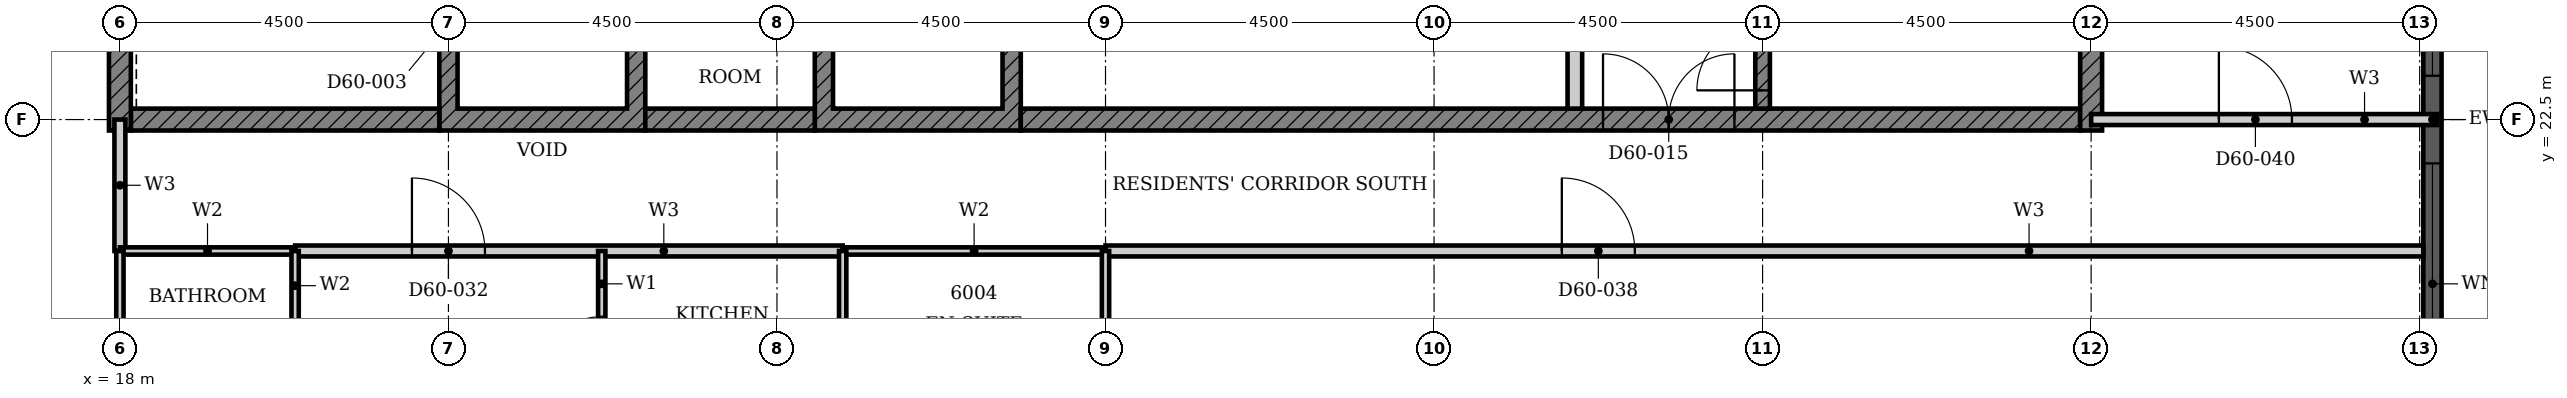
"""IFC4 building model, lengths in metres.
Left out: names, types, materials, properties, quantities, classifications, styles, units other than length and angle.
Written with IfcOpenShell. Run it as: python <this file> out.ifc"""

import sys

from ifc_helpers import new_model, si_unit, direction, frame, frame_2d, origin, place, context, subcontext, project, spatial, polyline, rectangle, outline, extrude, element, fill, save


model = new_model("IFC4")
c1 = context("Model", 3, precision=1e-05, world=origin(), true_north=direction((0.0, 1.0)))
c2 = subcontext(c1, "Body", "Model", "MODEL_VIEW")
j1 = project(units=[si_unit("LENGTHUNIT", "METRE"), si_unit("PLANEANGLEUNIT", "RADIAN")], contexts=[c1])
p1 = place(None, origin())
s1 = spatial("IfcSite", under=j1, at=p1, CompositionType="ELEMENT")
p2 = place(p1, origin())
s2 = spatial("IfcBuilding", under=s1, at=p2, CompositionType="ELEMENT")
p3 = place(p2, frame((0.0, 0.0, 237.9)))
s3 = spatial("IfcBuildingStorey", under=s2, at=p3, CompositionType="ELEMENT", Elevation=237.9)
p4 = place(p3, frame((49.675, 18.3, 0.0), z_axis=(0.0, 0.0, 1.0), x_axis=(0.0, 1.0, 0.0)))
e1 = element("IfcWall", 1, at=p4, inside=s3, PredefinedType="SOLIDWALL", context=c2, shape_type="SweptSolid", body=[
    extrude(rectangle(XDim=8.4, YDim=0.25, at=frame_2d((4.2, 0.0))), origin(), (0.0, 0.0, 1.0), 3.7),
])
p5 = place(p4, frame((0.3, 0.0, 0.45)))
e2 = element("IfcOpeningElement", 2, at=p5, cuts=e1, PredefinedType="OPENING", context=c2, shape_type="SweptSolid", body=[
    extrude(rectangle(XDim=3.3, YDim=2.3, at=frame_2d((1.65, 1.15))), frame((0.0, 0.135, 0.0), z_axis=(0.0, -1.0, 0.0), x_axis=(1.0, 0.0, 0.0)), (0.0, 0.0, 1.0), 0.27),
])
p6 = place(p4, frame((4.8, 0.0, 0.45)))
e3 = element("IfcOpeningElement", 3, at=p6, cuts=e1, PredefinedType="OPENING", context=c2, shape_type="SweptSolid", body=[
    extrude(rectangle(XDim=3.3, YDim=2.3, at=frame_2d((1.65, 1.15))), frame((0.0, 0.135, 0.0), z_axis=(0.0, -1.0, 0.0), x_axis=(1.0, 0.0, 0.0)), (0.0, 0.0, 1.0), 0.27),
])
p7 = place(p3, origin())
e4 = element("IfcWall", 4, at=p7, inside=s3, PredefinedType="SHEAR", context=c2, shape_type="SweptSolid", body=[
    extrude(outline(polyline([(22.375, 22.35), (25.197, 22.35), (25.197, 25.275), (24.947, 25.275), (24.947, 22.65), (22.625, 22.65), (22.625, 25.275), (22.375, 25.275), (22.375, 22.35)])), origin(), (0.0, 0.0, 1.0), 3.4),
])
p8 = place(p3, origin())
e5 = element("IfcWall", 5, at=p8, inside=s3, PredefinedType="SHEAR", context=c2, shape_type="SweptSolid", body=[
    extrude(outline(polyline([(27.518, 22.35), (30.339, 22.35), (30.339, 25.275), (30.089, 25.275), (30.089, 22.65), (27.768, 22.65), (27.768, 25.275), (27.518, 25.275), (27.518, 22.35)])), origin(), (0.0, 0.0, 1.0), 3.4),
])
p9 = place(p3, frame((18.15, 22.5, 0.0), z_axis=(0.0, 0.0, 1.0), x_axis=(1.0, 0.0, 0.0)))
e6 = element("IfcWall", 6, at=p9, inside=s3, PredefinedType="SHEAR", context=c2, shape_type="SweptSolid", body=[
    extrude(rectangle(XDim=4.225, YDim=0.3, at=frame_2d((2.113, 0.0))), origin(), (0.0, 0.0, 1.0), 3.4),
])
p10 = place(p3, frame((25.197, 22.5, 0.0), z_axis=(0.0, 0.0, 1.0), x_axis=(1.0, 0.0, 0.0)))
e7 = element("IfcWall", 7, at=p10, inside=s3, PredefinedType="SHEAR", context=c2, shape_type="SweptSolid", body=[
    extrude(rectangle(XDim=2.321, YDim=0.3, at=frame_2d((1.161, 0.0))), origin(), (0.0, 0.0, 1.0), 3.4),
])
p11 = place(p3, frame((30.339, 22.5, 0.0), z_axis=(0.0, 0.0, 1.0), x_axis=(1.0, 0.0, 0.0)))
e8 = element("IfcWall", 8, at=p11, inside=s3, PredefinedType="SHEAR", context=c2, shape_type="SweptSolid", body=[
    extrude(rectangle(XDim=14.511, YDim=0.3, at=frame_2d((7.255, 0.0))), origin(), (0.0, 0.0, 1.0), 3.4),
])
p12 = place(p11, frame((7.975, 0.0, 0.0)))
e9 = element("IfcOpeningElement", 9, at=p12, cuts=e8, PredefinedType="OPENING", context=c2, shape_type="SweptSolid", body=[
    extrude(rectangle(XDim=1.8, YDim=2.1, at=frame_2d((0.9, 1.05))), frame((0.0, 0.16, 0.0), z_axis=(0.0, -1.0, 0.0), x_axis=(1.0, 0.0, 0.0)), (0.0, 0.0, 1.0), 0.32),
])
for number, where, z_axis, x_axis in (
    (10, (18.0, 22.35, 0.0), (0.0, 0.0, 1.0), (0.0, 1.0, 0.0)),
    (11, (45.0, 22.35, 0.0), (0.0, 0.0, 1.0), (0.0, 1.0, 0.0)),
):
    element("IfcWall", number, at=place(p3, frame(where, z_axis=z_axis, x_axis=x_axis)), inside=s3, PredefinedType="SHEAR", context=c2, shape_type="SweptSolid", body=[
        extrude(rectangle(XDim=9.3, YDim=0.3, at=frame_2d((4.65, 0.0))), origin(), (0.0, 0.0, 1.0), 3.4),
    ])
p13 = place(p3, frame((37.928, 22.65, 0.0), z_axis=(0.0, 0.0, 1.0), x_axis=(0.0, 1.0, 0.0)))
e12 = element("IfcWall", 12, at=p13, inside=s3, PredefinedType="PARTITIONING", context=c2, shape_type="SweptSolid", body=[
    extrude(rectangle(XDim=2.625, YDim=0.2, at=frame_2d((1.312, 0.0))), origin(), (0.0, 0.0, 1.0), 3.4),
])
p14 = place(p3, frame((40.5, 22.65, 0.0), z_axis=(0.0, 0.0, 1.0), x_axis=(0.0, 1.0, 0.0)))
e13 = element("IfcWall", 13, at=p14, inside=s3, PredefinedType="SHEAR", context=c2, shape_type="SweptSolid", body=[
    extrude(rectangle(XDim=5.825, YDim=0.2, at=frame_2d((2.913, 0.0))), origin(), (0.0, 0.0, 1.0), 3.4),
])
p15 = place(p14, frame((0.25, 0.0, 0.0)))
e14 = element("IfcOpeningElement", 14, at=p15, cuts=e13, PredefinedType="OPENING", context=c2, shape_type="SweptSolid", body=[
    extrude(rectangle(XDim=1.8, YDim=2.1, at=frame_2d((0.9, 1.05))), frame((0.0, 0.11, 0.0), z_axis=(0.0, -1.0, 0.0), x_axis=(1.0, 0.0, 0.0)), (0.0, 0.0, 1.0), 0.22),
])
p16 = place(p3, frame((20.4, 20.7, 0.0), z_axis=(0.0, 0.0, 1.0), x_axis=(1.0, 0.0, 0.0)))
e15 = element("IfcWall", 15, at=p16, inside=s3, PredefinedType="PARTITIONING", context=c2, shape_type="SweptSolid", body=[
    extrude(rectangle(XDim=7.5, YDim=0.15, at=frame_2d((3.75, 0.0))), origin(), (0.0, 0.0, 1.0), 3.4),
])
p17 = place(p16, frame((1.6, 0.0, 0.0)))
e16 = element("IfcOpeningElement", 16, at=p17, cuts=e15, PredefinedType="OPENING", context=c2, shape_type="SweptSolid", body=[
    extrude(rectangle(XDim=1.0, YDim=2.2, at=frame_2d((0.5, 1.1))), frame((0.0, 0.085, 0.0), z_axis=(0.0, -1.0, 0.0), x_axis=(1.0, 0.0, 0.0)), (0.0, 0.0, 1.0), 0.17),
])
p18 = place(p3, frame((31.5, 20.7, 0.0), z_axis=(0.0, 0.0, 1.0), x_axis=(1.0, 0.0, 0.0)))
e17 = element("IfcWall", 17, at=p18, inside=s3, PredefinedType="PARTITIONING", context=c2, shape_type="SweptSolid", body=[
    extrude(rectangle(XDim=18.05, YDim=0.15, at=frame_2d((9.025, 0.0))), origin(), (0.0, 0.0, 1.0), 3.4),
])
p19 = place(p18, frame((6.25, 0.0, 0.0)))
e18 = element("IfcOpeningElement", 18, at=p19, cuts=e17, PredefinedType="OPENING", context=c2, shape_type="SweptSolid", body=[
    extrude(rectangle(XDim=1.0, YDim=2.1, at=frame_2d((0.5, 1.05))), frame((0.0, 0.085, 0.0), z_axis=(0.0, -1.0, 0.0), x_axis=(1.0, 0.0, 0.0)), (0.0, 0.0, 1.0), 0.17),
])
p20 = place(p3, frame((45.0, 22.5, 0.0), z_axis=(0.0, 0.0, 1.0), x_axis=(1.0, 0.0, 0.0)))
e19 = element("IfcWall", 19, at=p20, inside=s3, PredefinedType="PARTITIONING", context=c2, shape_type="SweptSolid", body=[
    extrude(rectangle(XDim=4.74, YDim=0.15, at=frame_2d((2.37, 0.0))), origin(), (0.0, 0.0, 1.0), 3.4),
])
p21 = place(p20, frame((1.75, 0.0, 0.0)))
e20 = element("IfcOpeningElement", 20, at=p21, cuts=e19, PredefinedType="OPENING", context=c2, shape_type="SweptSolid", body=[
    extrude(rectangle(XDim=1.0, YDim=2.2, at=frame_2d((0.5, 1.1))), frame((0.0, 0.085, 0.0), z_axis=(0.0, -1.0, 0.0), x_axis=(1.0, 0.0, 0.0)), (0.0, 0.0, 1.0), 0.17),
])
p22 = place(p3, frame((18.0, 20.7, 0.0), z_axis=(0.0, 0.0, 1.0), x_axis=(0.0, 1.0, 0.0)))
e21 = element("IfcWall", 21, at=p22, inside=s3, PredefinedType="PARTITIONING", context=c2, shape_type="SweptSolid", body=[
    extrude(rectangle(XDim=1.8, YDim=0.15, at=frame_2d((0.9, 0.0))), origin(), (0.0, 0.0, 1.0), 3.4),
])
p23 = place(p3, frame((24.6, 18.0, 0.0), z_axis=(0.0, 0.0, 1.0), x_axis=(0.0, 1.0, 0.0)))
e22 = element("IfcWall", 22, at=p23, inside=s3, PredefinedType="PARTITIONING", context=c2, shape_type="SweptSolid", body=[
    extrude(rectangle(XDim=2.7, YDim=0.1, at=frame_2d((1.35, 0.0))), origin(), (0.0, 0.0, 1.0), 3.4),
])
p24 = place(p23, frame((0.9, 0.0, 0.0)))
e23 = element("IfcOpeningElement", 23, at=p24, cuts=e22, PredefinedType="OPENING", context=c2, shape_type="SweptSolid", body=[
    extrude(rectangle(XDim=0.9, YDim=2.1, at=frame_2d((0.45, 1.05))), frame((0.0, 0.06, 0.0), z_axis=(0.0, -1.0, 0.0), x_axis=(1.0, 0.0, 0.0)), (0.0, 0.0, 1.0), 0.12),
])
p25 = place(p3, frame((18.0, 20.7, 0.0), z_axis=(0.0, 0.0, 1.0), x_axis=(1.0, 0.0, 0.0)))
e24 = element("IfcWall", 24, at=p25, inside=s3, PredefinedType="PARTITIONING", context=c2, shape_type="SweptSolid", body=[
    extrude(rectangle(XDim=2.4, YDim=0.1, at=frame_2d((1.2, 0.0))), origin(), (0.0, 0.0, 1.0), 3.4),
])
p26 = place(p3, frame((27.9, 20.7, 0.0), z_axis=(0.0, 0.0, 1.0), x_axis=(1.0, 0.0, 0.0)))
e25 = element("IfcWall", 25, at=p26, inside=s3, PredefinedType="PARTITIONING", context=c2, shape_type="SweptSolid", body=[
    extrude(rectangle(XDim=3.6, YDim=0.1, at=frame_2d((1.8, 0.0))), origin(), (0.0, 0.0, 1.0), 3.4),
])
p27 = place(p3, frame((18.0, 18.0, 0.0), z_axis=(0.0, 0.0, 1.0), x_axis=(0.0, 1.0, 0.0)))
e26 = element("IfcWall", 26, at=p27, inside=s3, PredefinedType="PARTITIONING", context=c2, shape_type="SweptSolid", body=[
    extrude(rectangle(XDim=2.7, YDim=0.1, at=frame_2d((1.35, 0.0))), origin(), (0.0, 0.0, 1.0), 3.4),
])
p28 = place(p3, frame((20.4, 18.0, 0.0), z_axis=(0.0, 0.0, 1.0), x_axis=(0.0, 1.0, 0.0)))
e27 = element("IfcWall", 27, at=p28, inside=s3, PredefinedType="PARTITIONING", context=c2, shape_type="SweptSolid", body=[
    extrude(rectangle(XDim=2.7, YDim=0.1, at=frame_2d((1.35, 0.0))), origin(), (0.0, 0.0, 1.0), 3.4),
])
p29 = place(p28, frame((0.95, 0.0, 0.0)))
e28 = element("IfcOpeningElement", 28, at=p29, cuts=e27, PredefinedType="OPENING", context=c2, shape_type="SweptSolid", body=[
    extrude(rectangle(XDim=0.8, YDim=2.1, at=frame_2d((0.4, 1.05))), frame((0.0, 0.06, 0.0), z_axis=(0.0, -1.0, 0.0), x_axis=(1.0, 0.0, 0.0)), (0.0, 0.0, 1.0), 0.12),
])
for number, where, z_axis, x_axis in (
    (29, (27.9, 18.0, 0.0), (0.0, 0.0, 1.0), (0.0, 1.0, 0.0)),
    (30, (31.5, 18.0, 0.0), (0.0, 0.0, 1.0), (0.0, 1.0, 0.0)),
):
    element("IfcWall", number, at=place(p3, frame(where, z_axis=z_axis, x_axis=x_axis)), inside=s3, PredefinedType="PARTITIONING", context=c2, shape_type="SweptSolid", body=[
        extrude(rectangle(XDim=2.7, YDim=0.1, at=frame_2d((1.35, 0.0))), origin(), (0.0, 0.0, 1.0), 3.4),
    ])
p30 = place(p5, origin())
e31 = element("IfcWindow", 31, at=p30, inside=s3, PartitioningType="SINGLE_PANEL", PredefinedType="WINDOW", context=c2, shape_type="SweptSolid", body=[
    extrude(rectangle(XDim=3.3, YDim=2.3, at=frame_2d((1.65, 1.15))), frame((0.0, 0.03, 0.0), z_axis=(0.0, -1.0, 0.0), x_axis=(1.0, 0.0, 0.0)), (0.0, 0.0, 1.0), 0.06),
])
fill(e2, e31)
p31 = place(p6, origin())
e32 = element("IfcWindow", 32, at=p31, inside=s3, PartitioningType="SINGLE_PANEL", PredefinedType="WINDOW", context=c2, shape_type="SweptSolid", body=[
    extrude(rectangle(XDim=3.3, YDim=2.3, at=frame_2d((1.65, 1.15))), frame((0.0, 0.03, 0.0), z_axis=(0.0, -1.0, 0.0), x_axis=(1.0, 0.0, 0.0)), (0.0, 0.0, 1.0), 0.06),
])
fill(e3, e32)
p32 = place(p15, origin())
e33 = element("IfcDoor", 33, at=p32, inside=s3, OperationType="DOUBLE_DOOR_SINGLE_SWING", PredefinedType="DOOR", context=c2, shape_type="SweptSolid", body=[
    extrude(rectangle(XDim=1.8, YDim=2.1, at=frame_2d((0.9, 1.05))), frame((0.0, 0.025, 0.0), z_axis=(0.0, -1.0, 0.0), x_axis=(1.0, 0.0, 0.0)), (0.0, 0.0, 1.0), 0.05),
])
fill(e14, e33)
p33 = place(p12, origin())
e34 = element("IfcDoor", 34, at=p33, inside=s3, OperationType="DOUBLE_DOOR_SINGLE_SWING", PredefinedType="DOOR", context=c2, shape_type="SweptSolid", body=[
    extrude(rectangle(XDim=1.8, YDim=2.1, at=frame_2d((0.9, 1.05))), frame((0.0, 0.025, 0.0), z_axis=(0.0, -1.0, 0.0), x_axis=(1.0, 0.0, 0.0)), (0.0, 0.0, 1.0), 0.05),
])
fill(e9, e34)
p34 = place(p17, origin())
e35 = element("IfcDoor", 35, at=p34, inside=s3, OperationType="SINGLE_SWING_RIGHT", PredefinedType="DOOR", context=c2, shape_type="SweptSolid", body=[
    extrude(rectangle(XDim=1.0, YDim=2.2, at=frame_2d((0.5, 1.1))), frame((0.0, 0.025, 0.0), z_axis=(0.0, -1.0, 0.0), x_axis=(1.0, 0.0, 0.0)), (0.0, 0.0, 1.0), 0.05),
])
fill(e16, e35)
p35 = place(p24, origin())
e36 = element("IfcDoor", 36, at=p35, inside=s3, OperationType="SINGLE_SWING_LEFT", PredefinedType="DOOR", context=c2, shape_type="SweptSolid", body=[
    extrude(rectangle(XDim=0.9, YDim=2.1, at=frame_2d((0.45, 1.05))), frame((0.0, 0.025, 0.0), z_axis=(0.0, -1.0, 0.0), x_axis=(1.0, 0.0, 0.0)), (0.0, 0.0, 1.0), 0.05),
])
fill(e23, e36)
p36 = place(p19, origin())
e37 = element("IfcDoor", 37, at=p36, inside=s3, OperationType="SINGLE_SWING_LEFT", PredefinedType="DOOR", context=c2, shape_type="SweptSolid", body=[
    extrude(rectangle(XDim=1.0, YDim=2.1, at=frame_2d((0.5, 1.05))), frame((0.0, 0.025, 0.0), z_axis=(0.0, -1.0, 0.0), x_axis=(1.0, 0.0, 0.0)), (0.0, 0.0, 1.0), 0.05),
])
fill(e18, e37)
p37 = place(p21, origin())
e38 = element("IfcDoor", 38, at=p37, inside=s3, OperationType="SINGLE_SWING_LEFT", PredefinedType="DOOR", context=c2, shape_type="SweptSolid", body=[
    extrude(rectangle(XDim=1.0, YDim=2.2, at=frame_2d((0.5, 1.1))), frame((0.0, 0.025, 0.0), z_axis=(0.0, -1.0, 0.0), x_axis=(1.0, 0.0, 0.0)), (0.0, 0.0, 1.0), 0.05),
])
fill(e20, e38)
save(model, sys.argv[1])
